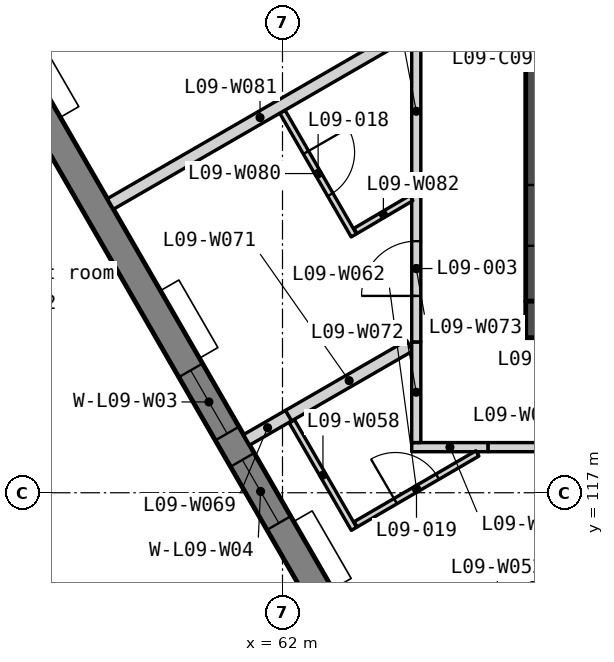
"""IFC4 building model, lengths in metres.
Left out: names, types, materials, properties, quantities, classifications, styles, units other than length and angle.
Written with IfcOpenShell. Run it as: python <this file> out.ifc"""

import sys

from ifc_helpers import new_model, si_unit, direction, frame, frame_2d, origin, place, context, subcontext, project, spatial, polyline, rectangle, outline, extrude, element, fill, save


model = new_model("IFC4")
c1 = context("Model", 3, precision=1e-05, world=origin(), true_north=direction((0.0, 1.0)))
c2 = subcontext(c1, "Body", "Model", "MODEL_VIEW")
j1 = project(units=[si_unit("LENGTHUNIT", "METRE"), si_unit("PLANEANGLEUNIT", "RADIAN")], contexts=[c1])
p1 = place(None, origin())
s1 = spatial("IfcSite", under=j1, at=p1, CompositionType="ELEMENT")
p2 = place(p1, origin())
s2 = spatial("IfcBuilding", under=s1, at=p2, CompositionType="ELEMENT")
p3 = place(p2, frame((0.0, 0.0, 45.5)))
s3 = spatial("IfcBuildingStorey", under=s2, at=p3, CompositionType="ELEMENT", Elevation=45.5)
p4 = place(p3, frame((66.3, 133.95, 0.0), z_axis=(0.0, 0.0, 1.0), x_axis=(0.0, -1.0, 0.0)))
e1 = element("IfcWall", 1, at=p4, inside=s3, PredefinedType="SOLIDWALL", context=c2, shape_type="SweptSolid", body=[
    extrude(rectangle(XDim=13.8, YDim=0.6, at=frame_2d((6.9, 0.0))), origin(), (0.0, 0.0, 1.0), 3.35),
])
p5 = place(p4, frame((0.6, 0.0, 0.0)))
e2 = element("IfcOpeningElement", 2, at=p5, cuts=e1, PredefinedType="OPENING", context=c2, shape_type="SweptSolid", body=[
    extrude(rectangle(XDim=1.1, YDim=2.1, at=frame_2d((0.55, 1.05))), frame((0.0, 0.31, 0.0), z_axis=(0.0, -1.0, 0.0), x_axis=(1.0, 0.0, 0.0)), (0.0, 0.0, 1.0), 0.62),
])
p6 = place(p4, frame((8.963, 0.0, 0.0)))
e3 = element("IfcOpeningElement", 3, at=p6, cuts=e1, PredefinedType="OPENING", context=c2, shape_type="SweptSolid", body=[
    extrude(rectangle(XDim=1.0, YDim=2.1, at=frame_2d((0.5, 1.05))), frame((0.0, 0.31, 0.0), z_axis=(0.0, -1.0, 0.0), x_axis=(1.0, 0.0, 0.0)), (0.0, 0.0, 1.0), 0.62),
])
p7 = place(p4, frame((11.888, 0.0, 0.0)))
e4 = element("IfcOpeningElement", 4, at=p7, cuts=e1, PredefinedType="OPENING", context=c2, shape_type="SweptSolid", body=[
    extrude(rectangle(XDim=1.0, YDim=2.1, at=frame_2d((0.5, 1.05))), frame((0.0, 0.31, 0.0), z_axis=(0.0, -1.0, 0.0), x_axis=(1.0, 0.0, 0.0)), (0.0, 0.0, 1.0), 0.62),
])
p8 = place(p3, frame((66.0, 119.85, 0.0), z_axis=(0.0, 0.0, 1.0), x_axis=(1.0, 0.0, 0.0)))
e5 = element("IfcWall", 5, at=p8, inside=s3, PredefinedType="SOLIDWALL", context=c2, shape_type="SweptSolid", body=[
    extrude(rectangle(XDim=28.0, YDim=0.6, at=frame_2d((14.0, 0.0))), origin(), (0.0, 0.0, 1.0), 3.35),
])
p9 = place(p8, frame((6.825, 0.0, 0.0)))
e6 = element("IfcOpeningElement", 6, at=p9, cuts=e5, PredefinedType="OPENING", context=c2, shape_type="SweptSolid", body=[
    extrude(rectangle(XDim=1.8, YDim=2.1, at=frame_2d((0.9, 1.05))), frame((0.0, 0.31, 0.0), z_axis=(0.0, -1.0, 0.0), x_axis=(1.0, 0.0, 0.0)), (0.0, 0.0, 1.0), 0.62),
])
p10 = place(p8, frame((15.85, 0.0, 0.0)))
e7 = element("IfcOpeningElement", 7, at=p10, cuts=e5, PredefinedType="OPENING", context=c2, shape_type="SweptSolid", body=[
    extrude(rectangle(XDim=1.5, YDim=2.1, at=frame_2d((0.75, 1.05))), frame((0.0, 0.31, 0.0), z_axis=(0.0, -1.0, 0.0), x_axis=(1.0, 0.0, 0.0)), (0.0, 0.0, 1.0), 0.62),
])
p11 = place(p8, frame((19.375, 0.0, 0.0)))
e8 = element("IfcOpeningElement", 8, at=p11, cuts=e5, PredefinedType="OPENING", context=c2, shape_type="SweptSolid", body=[
    extrude(rectangle(XDim=1.8, YDim=2.1, at=frame_2d((0.9, 1.05))), frame((0.0, 0.31, 0.0), z_axis=(0.0, -1.0, 0.0), x_axis=(1.0, 0.0, 0.0)), (0.0, 0.0, 1.0), 0.62),
])
p12 = place(p8, frame((4.425, 0.0, 0.0)))
e9 = element("IfcOpeningElement", 9, at=p12, cuts=e5, PredefinedType="OPENING", context=c2, shape_type="SweptSolid", body=[
    extrude(rectangle(XDim=1.0, YDim=2.1, at=frame_2d((0.5, 1.05))), frame((0.0, 0.31, 0.0), z_axis=(0.0, -1.0, 0.0), x_axis=(1.0, 0.0, 0.0)), (0.0, 0.0, 1.0), 0.62),
])
p13 = place(p8, frame((9.783, 0.0, 0.0)))
e10 = element("IfcOpeningElement", 10, at=p13, cuts=e5, PredefinedType="OPENING", context=c2, shape_type="SweptSolid", body=[
    extrude(rectangle(XDim=1.0, YDim=2.1, at=frame_2d((0.5, 1.05))), frame((0.0, 0.31, 0.0), z_axis=(0.0, -1.0, 0.0), x_axis=(1.0, 0.0, 0.0)), (0.0, 0.0, 1.0), 0.62),
])
p14 = place(p8, frame((11.525, 0.0, 0.0)))
e11 = element("IfcOpeningElement", 11, at=p14, cuts=e5, PredefinedType="OPENING", context=c2, shape_type="SweptSolid", body=[
    extrude(rectangle(XDim=1.0, YDim=2.1, at=frame_2d((0.5, 1.05))), frame((0.0, 0.31, 0.0), z_axis=(0.0, -1.0, 0.0), x_axis=(1.0, 0.0, 0.0)), (0.0, 0.0, 1.0), 0.62),
])
p15 = place(p8, frame((13.658, 0.0, 0.0)))
e12 = element("IfcOpeningElement", 12, at=p15, cuts=e5, PredefinedType="OPENING", context=c2, shape_type="SweptSolid", body=[
    extrude(rectangle(XDim=1.0, YDim=2.1, at=frame_2d((0.5, 1.05))), frame((0.0, 0.31, 0.0), z_axis=(0.0, -1.0, 0.0), x_axis=(1.0, 0.0, 0.0)), (0.0, 0.0, 1.0), 0.62),
])
p16 = place(p8, frame((22.575, 0.0, 0.0)))
e13 = element("IfcOpeningElement", 13, at=p16, cuts=e5, PredefinedType="OPENING", context=c2, shape_type="SweptSolid", body=[
    extrude(rectangle(XDim=1.0, YDim=2.1, at=frame_2d((0.5, 1.05))), frame((0.0, 0.31, 0.0), z_axis=(0.0, -1.0, 0.0), x_axis=(1.0, 0.0, 0.0)), (0.0, 0.0, 1.0), 0.62),
])
p17 = place(p3, frame((54.495, 129.397, -0.15), z_axis=(0.0, 0.0, 1.0), x_axis=(0.499999201451, -0.866025864826, 0.0)))
e14 = element("IfcWall", 14, at=p17, inside=s3, PredefinedType="SOLIDWALL", context=c2, shape_type="SweptSolid", body=[
    extrude(outline(polyline([(44.8, 0.0), (44.8, 3.5), (0.0, 3.5), (0.0, 0.0), (44.8, 0.0)])), frame((0.0, 0.225, 0.0), z_axis=(0.0, -1.0, 0.0), x_axis=(1.0, 0.0, 0.0)), (0.0, 0.0, 1.0), 0.45),
])
p18 = place(p17, frame((3.03, 0.0, 1.05)))
e15 = element("IfcOpeningElement", 15, at=p18, cuts=e14, PredefinedType="OPENING", context=c2, shape_type="SweptSolid", body=[
    extrude(rectangle(XDim=1.2, YDim=1.5, at=frame_2d((0.6, 0.75))), frame((0.0, 0.235, 0.0), z_axis=(0.0, -1.0, 0.0), x_axis=(1.0, 0.0, 0.0)), (0.0, 0.0, 1.0), 0.47),
])
p19 = place(p17, frame((4.73, 0.0, 1.05)))
e16 = element("IfcOpeningElement", 16, at=p19, cuts=e14, PredefinedType="OPENING", context=c2, shape_type="SweptSolid", body=[
    extrude(rectangle(XDim=1.2, YDim=1.5, at=frame_2d((0.6, 0.75))), frame((0.0, 0.235, 0.0), z_axis=(0.0, -1.0, 0.0), x_axis=(1.0, 0.0, 0.0)), (0.0, 0.0, 1.0), 0.47),
])
p20 = place(p17, frame((11.99, 0.0, 1.05)))
e17 = element("IfcOpeningElement", 17, at=p20, cuts=e14, PredefinedType="OPENING", context=c2, shape_type="SweptSolid", body=[
    extrude(rectangle(XDim=1.2, YDim=1.5, at=frame_2d((0.6, 0.75))), frame((0.0, 0.235, 0.0), z_axis=(0.0, -1.0, 0.0), x_axis=(1.0, 0.0, 0.0)), (0.0, 0.0, 1.0), 0.47),
])
p21 = place(p17, frame((13.69, 0.0, 1.05)))
e18 = element("IfcOpeningElement", 18, at=p21, cuts=e14, PredefinedType="OPENING", context=c2, shape_type="SweptSolid", body=[
    extrude(rectangle(XDim=1.2, YDim=1.5, at=frame_2d((0.6, 0.75))), frame((0.0, 0.235, 0.0), z_axis=(0.0, -1.0, 0.0), x_axis=(1.0, 0.0, 0.0)), (0.0, 0.0, 1.0), 0.47),
])
p22 = place(p17, frame((20.95, 0.0, 1.05)))
e19 = element("IfcOpeningElement", 19, at=p22, cuts=e14, PredefinedType="OPENING", context=c2, shape_type="SweptSolid", body=[
    extrude(rectangle(XDim=1.2, YDim=1.5, at=frame_2d((0.6, 0.75))), frame((0.0, 0.235, 0.0), z_axis=(0.0, -1.0, 0.0), x_axis=(1.0, 0.0, 0.0)), (0.0, 0.0, 1.0), 0.47),
])
p23 = place(p17, frame((22.65, 0.0, 1.05)))
e20 = element("IfcOpeningElement", 20, at=p23, cuts=e14, PredefinedType="OPENING", context=c2, shape_type="SweptSolid", body=[
    extrude(rectangle(XDim=1.2, YDim=1.5, at=frame_2d((0.6, 0.75))), frame((0.0, 0.235, 0.0), z_axis=(0.0, -1.0, 0.0), x_axis=(1.0, 0.0, 0.0)), (0.0, 0.0, 1.0), 0.47),
])
p24 = place(p17, frame((29.91, 0.0, 1.05)))
e21 = element("IfcOpeningElement", 21, at=p24, cuts=e14, PredefinedType="OPENING", context=c2, shape_type="SweptSolid", body=[
    extrude(rectangle(XDim=1.2, YDim=1.5, at=frame_2d((0.6, 0.75))), frame((0.0, 0.235, 0.0), z_axis=(0.0, -1.0, 0.0), x_axis=(1.0, 0.0, 0.0)), (0.0, 0.0, 1.0), 0.47),
])
p25 = place(p17, frame((31.61, 0.0, 1.05)))
e22 = element("IfcOpeningElement", 22, at=p25, cuts=e14, PredefinedType="OPENING", context=c2, shape_type="SweptSolid", body=[
    extrude(rectangle(XDim=1.2, YDim=1.5, at=frame_2d((0.6, 0.75))), frame((0.0, 0.235, 0.0), z_axis=(0.0, -1.0, 0.0), x_axis=(1.0, 0.0, 0.0)), (0.0, 0.0, 1.0), 0.47),
])
p26 = place(p17, frame((38.87, 0.0, 1.05)))
e23 = element("IfcOpeningElement", 23, at=p26, cuts=e14, PredefinedType="OPENING", context=c2, shape_type="SweptSolid", body=[
    extrude(rectangle(XDim=1.2, YDim=1.5, at=frame_2d((0.6, 0.75))), frame((0.0, 0.235, 0.0), z_axis=(0.0, -1.0, 0.0), x_axis=(1.0, 0.0, 0.0)), (0.0, 0.0, 1.0), 0.47),
])
p27 = place(p17, frame((40.57, 0.0, 1.05)))
e24 = element("IfcOpeningElement", 24, at=p27, cuts=e14, PredefinedType="OPENING", context=c2, shape_type="SweptSolid", body=[
    extrude(rectangle(XDim=1.2, YDim=1.5, at=frame_2d((0.6, 0.75))), frame((0.0, 0.235, 0.0), z_axis=(0.0, -1.0, 0.0), x_axis=(1.0, 0.0, 0.0)), (0.0, 0.0, 1.0), 0.47),
])
p28 = place(p3, frame((63.65, 113.99, 0.0), z_axis=(0.0, 0.0, 1.0), x_axis=(0.866027639635, 0.499996127374, 0.0)))
e25 = element("IfcWall", 25, at=p28, inside=s3, PredefinedType="PARTITIONING", context=c2, shape_type="SweptSolid", body=[
    extrude(rectangle(XDim=4.35, YDim=0.2, at=frame_2d((2.175, 0.0))), origin(), (0.0, 0.0, 1.0), 3.35),
])
p29 = place(p3, frame((62.156, 118.173, 0.0), z_axis=(0.0, 0.0, 1.0), x_axis=(0.500026340207, -0.866010195725, 0.0)))
e26 = element("IfcWall", 26, at=p29, inside=s3, PredefinedType="PARTITIONING", context=c2, shape_type="SweptSolid", body=[
    extrude(rectangle(XDim=2.04, YDim=0.1, at=frame_2d((1.02, 0.0))), origin(), (0.0, 0.0, 1.0), 3.35),
])
p30 = place(p3, frame((64.125, 117.75, 0.0), z_axis=(0.0, 0.0, 1.0), x_axis=(1.0, 0.0, 0.0)))
e27 = element("IfcWall", 27, at=p30, inside=s3, PredefinedType="PARTITIONING", context=c2, shape_type="SweptSolid", body=[
    extrude(rectangle(XDim=1.257, YDim=0.15, at=frame_2d((0.628, 0.0))), origin(), (0.0, 0.0, 1.0), 3.35),
])
p31 = place(p3, frame((63.202, 116.48, 0.0), z_axis=(0.0, 0.0, 1.0), x_axis=(0.864103474136, 0.503314202051, 0.0)))
e28 = element("IfcWall", 28, at=p31, inside=s3, PredefinedType="PARTITIONING", context=c2, shape_type="SweptSolid", body=[
    extrude(rectangle(XDim=2.318, YDim=0.1, at=frame_2d((1.159, 0.0))), origin(), (0.0, 0.0, 1.0), 3.35),
])
p32 = place(p31, frame((0.759, 0.0, 0.0)))
e29 = element("IfcOpeningElement", 29, at=p32, cuts=e28, PredefinedType="OPENING", context=c2, shape_type="SweptSolid", body=[
    extrude(rectangle(XDim=0.8, YDim=2.1, at=frame_2d((0.4, 1.05))), frame((0.0, 0.06, 0.0), z_axis=(0.0, -1.0, 0.0), x_axis=(1.0, 0.0, 0.0)), (0.0, 0.0, 1.0), 0.12),
])
p33 = place(p3, frame((65.382, 117.75, 0.0), z_axis=(0.0, 0.0, 1.0), x_axis=(1.0, 0.0, 0.0)))
e30 = element("IfcWall", 30, at=p33, inside=s3, PredefinedType="PARTITIONING", context=c2, shape_type="SweptSolid", body=[
    extrude(rectangle(XDim=3.992, YDim=0.15, at=frame_2d((1.996, 0.0))), origin(), (0.0, 0.0, 1.0), 3.35),
])
p34 = place(p33, frame((1.546, 0.0, 0.0)))
e31 = element("IfcOpeningElement", 31, at=p34, cuts=e30, PredefinedType="OPENING", context=c2, shape_type="SweptSolid", body=[
    extrude(rectangle(XDim=0.9, YDim=2.1, at=frame_2d((0.45, 1.05))), frame((0.0, 0.085, 0.0), z_axis=(0.0, -1.0, 0.0), x_axis=(1.0, 0.0, 0.0)), (0.0, 0.0, 1.0), 0.17),
])
p35 = place(p3, frame((61.41, 117.87, 0.0), z_axis=(0.0, 0.0, 1.0), x_axis=(0.866068339032, 0.499925626596, 0.0)))
e32 = element("IfcWall", 32, at=p35, inside=s3, PredefinedType="PARTITIONING", context=c2, shape_type="SweptSolid", body=[
    extrude(rectangle(XDim=0.797, YDim=0.2, at=frame_2d((0.399, 0.0))), origin(), (0.0, 0.0, 1.0), 3.35),
])
p36 = place(p3, frame((62.1, 118.269, 0.0), z_axis=(0.0, 0.0, 1.0), x_axis=(0.866045914105, 0.4999644734, 0.0)))
e33 = element("IfcWall", 33, at=p36, inside=s3, PredefinedType="PARTITIONING", context=c2, shape_type="SweptSolid", body=[
    extrude(rectangle(XDim=2.3, YDim=0.2, at=frame_2d((1.15, 0.0))), origin(), (0.0, 0.0, 1.0), 3.35),
])
p37 = place(p3, frame((64.2, 117.825, 0.0), z_axis=(0.0, 0.0, 1.0), x_axis=(0.0, 1.0, 0.0)))
e34 = element("IfcWall", 34, at=p37, inside=s3, PredefinedType="PARTITIONING", context=c2, shape_type="SweptSolid", body=[
    extrude(rectangle(XDim=1.656, YDim=0.15, at=frame_2d((0.828, 0.0))), origin(), (0.0, 0.0, 1.0), 3.35),
])
p38 = place(p3, frame((64.2, 119.481, 0.0), z_axis=(0.0, 0.0, 1.0), x_axis=(0.0, 1.0, 0.0)))
e35 = element("IfcWall", 35, at=p38, inside=s3, PredefinedType="PARTITIONING", context=c2, shape_type="SweptSolid", body=[
    extrude(rectangle(XDim=2.413, YDim=0.15, at=frame_2d((1.207, 0.0))), origin(), (0.0, 0.0, 1.0), 3.35),
])
p39 = place(p38, frame((0.757, 0.0, 0.0)))
e36 = element("IfcOpeningElement", 36, at=p39, cuts=e35, PredefinedType="OPENING", context=c2, shape_type="SweptSolid", body=[
    extrude(rectangle(XDim=0.9, YDim=2.1, at=frame_2d((0.45, 1.05))), frame((0.0, 0.085, 0.0), z_axis=(0.0, -1.0, 0.0), x_axis=(1.0, 0.0, 0.0)), (0.0, 0.0, 1.0), 0.17),
])
p40 = place(p3, frame((61.998, 123.267, 0.0), z_axis=(0.0, 0.0, 1.0), x_axis=(0.500016218704, -0.866016039709, 0.0)))
e37 = element("IfcWall", 37, at=p40, inside=s3, PredefinedType="PARTITIONING", context=c2, shape_type="SweptSolid", body=[
    extrude(rectangle(XDim=2.35, YDim=0.1, at=frame_2d((1.175, 0.0))), origin(), (0.0, 0.0, 1.0), 3.35),
])
p41 = place(p40, frame((0.775, 0.0, 0.0)))
e38 = element("IfcOpeningElement", 38, at=p41, cuts=e37, PredefinedType="OPENING", context=c2, shape_type="SweptSolid", body=[
    extrude(rectangle(XDim=0.8, YDim=2.1, at=frame_2d((0.4, 1.05))), frame((0.0, 0.06, 0.0), z_axis=(0.0, -1.0, 0.0), x_axis=(1.0, 0.0, 0.0)), (0.0, 0.0, 1.0), 0.12),
])
p42 = place(p3, frame((59.17, 121.75, 0.0), z_axis=(0.0, 0.0, 1.0), x_axis=(0.866043237112, 0.499969110498, 0.0)))
e39 = element("IfcWall", 39, at=p42, inside=s3, PredefinedType="PARTITIONING", context=c2, shape_type="SweptSolid", body=[
    extrude(rectangle(XDim=5.683, YDim=0.2, at=frame_2d((2.842, 0.0))), origin(), (0.0, 0.0, 1.0), 3.35),
])
p43 = place(p3, frame((63.2, 121.306, 0.0), z_axis=(0.0, 0.0, 1.0), x_axis=(0.86196956313, 0.506960030216, 0.0)))
e40 = element("IfcWall", 40, at=p43, inside=s3, PredefinedType="PARTITIONING", context=c2, shape_type="SweptSolid", body=[
    extrude(rectangle(XDim=1.065, YDim=0.1, at=frame_2d((0.533, 0.0))), origin(), (0.0, 0.0, 1.0), 3.35),
])
p44 = place(p3, frame((64.2, 121.894, 0.0), z_axis=(0.0, 0.0, 1.0), x_axis=(0.0, 1.0, 0.0)))
e41 = element("IfcWall", 41, at=p44, inside=s3, PredefinedType="PARTITIONING", context=c2, shape_type="SweptSolid", body=[
    extrude(rectangle(XDim=2.76, YDim=0.15, at=frame_2d((1.38, 0.0))), origin(), (0.0, 0.0, 1.0), 3.35),
])
p45 = place(p20, origin())
e42 = element("IfcWindow", 42, at=p45, inside=s3, PartitioningType="SINGLE_PANEL", PredefinedType="WINDOW", context=c2, shape_type="SweptSolid", body=[
    extrude(rectangle(XDim=1.2, YDim=1.5, at=frame_2d((0.6, 0.75))), frame((0.0, 0.03, 0.0), z_axis=(0.0, -1.0, 0.0), x_axis=(1.0, 0.0, 0.0)), (0.0, 0.0, 1.0), 0.06),
])
fill(e17, e42)
p46 = place(p21, origin())
e43 = element("IfcWindow", 43, at=p46, inside=s3, PartitioningType="SINGLE_PANEL", PredefinedType="WINDOW", context=c2, shape_type="SweptSolid", body=[
    extrude(rectangle(XDim=1.2, YDim=1.5, at=frame_2d((0.6, 0.75))), frame((0.0, 0.03, 0.0), z_axis=(0.0, -1.0, 0.0), x_axis=(1.0, 0.0, 0.0)), (0.0, 0.0, 1.0), 0.06),
])
fill(e18, e43)
p47 = place(p39, origin())
e44 = element("IfcDoor", 44, at=p47, inside=s3, OperationType="SINGLE_SWING_LEFT", PredefinedType="DOOR", context=c2, shape_type="SweptSolid", body=[
    extrude(rectangle(XDim=0.9, YDim=2.1, at=frame_2d((0.45, 1.05))), frame((0.0, 0.025, 0.0), z_axis=(0.0, -1.0, 0.0), x_axis=(1.0, 0.0, 0.0)), (0.0, 0.0, 1.0), 0.05),
])
fill(e36, e44)
p48 = place(p41, origin())
e45 = element("IfcDoor", 45, at=p48, inside=s3, OperationType="SINGLE_SWING_LEFT", PredefinedType="DOOR", context=c2, shape_type="SweptSolid", body=[
    extrude(rectangle(XDim=0.8, YDim=2.1, at=frame_2d((0.4, 1.05))), frame((0.0, 0.025, 0.0), z_axis=(0.0, -1.0, 0.0), x_axis=(1.0, 0.0, 0.0)), (0.0, 0.0, 1.0), 0.05),
])
fill(e38, e45)
p49 = place(p32, origin())
e46 = element("IfcDoor", 46, at=p49, inside=s3, OperationType="SINGLE_SWING_LEFT", PredefinedType="DOOR", context=c2, shape_type="SweptSolid", body=[
    extrude(rectangle(XDim=0.8, YDim=2.1, at=frame_2d((0.4, 1.05))), frame((0.0, 0.025, 0.0), z_axis=(0.0, -1.0, 0.0), x_axis=(1.0, 0.0, 0.0)), (0.0, 0.0, 1.0), 0.05),
])
fill(e29, e46)
save(model, sys.argv[1])
